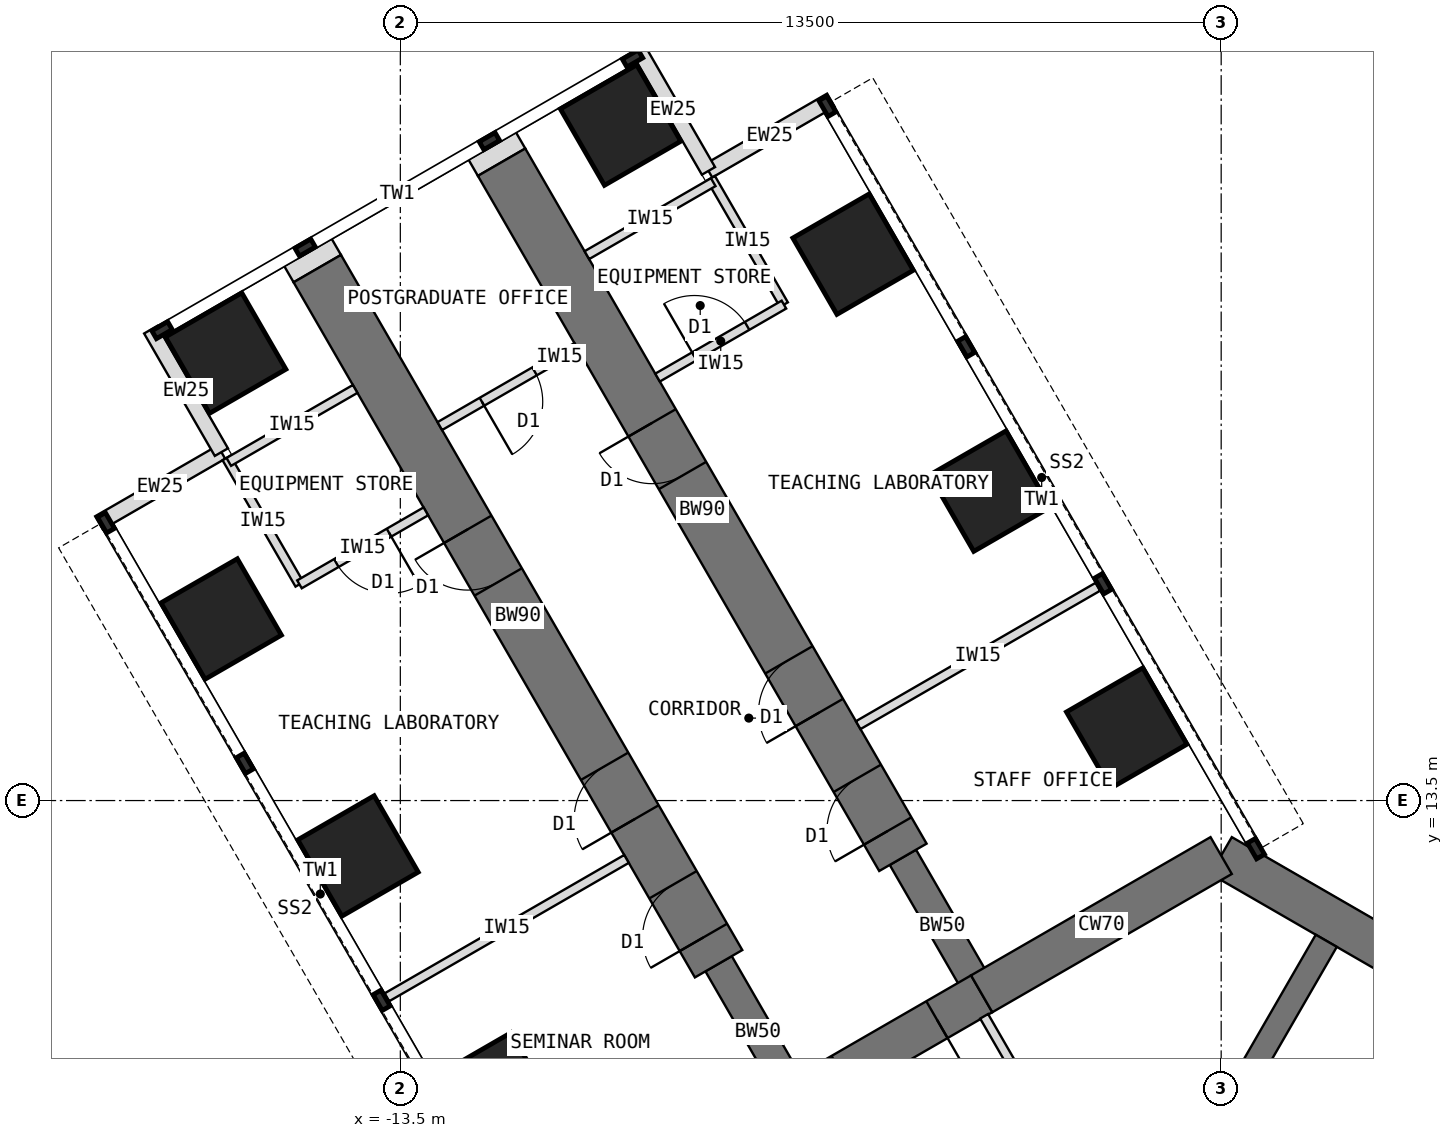
"""IFC4 building model, lengths in metres.
Left out: names, types, materials, properties, quantities, classifications, styles, units other than length and angle.
Written with IfcOpenShell. Run it as: python <this file> out.ifc"""

import sys

from ifc_helpers import new_model, si_unit, direction, frame, frame_2d, origin, origin_2d, place, context, subcontext, project, spatial, rectangle, extrude, element, fill, save


model = new_model("IFC4")
c1 = context("Model", 3, precision=1e-05, world=origin(), true_north=direction((0.0, 1.0)))
c2 = subcontext(c1, "Body", "Model", "MODEL_VIEW")
j1 = project(units=[si_unit("LENGTHUNIT", "METRE"), si_unit("PLANEANGLEUNIT", "RADIAN")], contexts=[c1])
p1 = place(None, origin())
s1 = spatial("IfcSite", under=j1, at=p1, CompositionType="ELEMENT")
p2 = place(p1, origin())
s2 = spatial("IfcBuilding", under=s1, at=p2, CompositionType="ELEMENT")
p3 = place(p2, frame((0.0, 0.0, 56.5)))
s3 = spatial("IfcBuildingStorey", under=s2, at=p3, CompositionType="ELEMENT", Elevation=56.5)
p4 = place(p3, frame((10.908, 6.298, 0.0), z_axis=(0.0, 0.0, 1.0), x_axis=(-0.866021940709, 0.500005998175, 0.0)))
e1 = element("IfcWall", 1, at=p4, inside=s3, PredefinedType="SHEAR", context=c2, shape_type="SweptSolid", body=[
    extrude(rectangle(XDim=12.596, YDim=0.7, at=frame_2d((6.298, 0.0))), origin(), (0.0, 0.0, 1.0), 4.0),
])
p5 = place(p3, frame((0.0, 12.596, 0.0), z_axis=(0.0, 0.0, 1.0), x_axis=(-0.866011268655, -0.500024481964, 0.0)))
e2 = element("IfcWall", 2, at=p5, inside=s3, PredefinedType="SHEAR", context=c2, shape_type="SweptSolid", body=[
    extrude(rectangle(XDim=4.548, YDim=0.7, at=frame_2d((2.274, 0.0))), origin(), (0.0, 0.0, 1.0), 4.0),
])
p6 = place(p3, frame((-3.939, 10.322, 0.0), z_axis=(0.0, 0.0, 1.0), x_axis=(-0.866019471182, -0.500010275428, 0.0)))
e3 = element("IfcWall", 3, at=p6, inside=s3, PredefinedType="SHEAR", context=c2, shape_type="SweptSolid", body=[
    extrude(rectangle(XDim=3.5, YDim=0.7, at=frame_2d((1.75, 0.0))), origin(), (0.0, 0.0, 1.0), 4.0),
])
p7 = place(p6, frame((0.85, 0.0, 0.0)))
e4 = element("IfcOpeningElement", 4, at=p7, cuts=e3, PredefinedType="OPENING", context=c2, shape_type="SweptSolid", body=[
    extrude(rectangle(XDim=1.8, YDim=2.1, at=frame_2d((0.9, 1.05))), frame((0.0, 0.36, 0.0), z_axis=(0.0, -1.0, 0.0), x_axis=(1.0, 0.0, 0.0)), (0.0, 0.0, 1.0), 0.72),
])
p8 = place(p3, frame((-6.97, 8.572, 0.0), z_axis=(0.0, 0.0, 1.0), x_axis=(-0.499988811324, 0.866031863473, 0.0)))
e5 = element("IfcWall", 5, at=p8, inside=s3, PredefinedType="SHEAR", context=c2, shape_type="SweptSolid", body=[
    extrude(rectangle(XDim=2.592, YDim=0.5, at=frame_2d((1.296, 0.0))), origin(), (0.0, 0.0, 1.0), 4.0),
])
p9 = place(p3, frame((-8.266, 10.816, 0.0), z_axis=(0.0, 0.0, 1.0), x_axis=(-0.499996231654, 0.866027579429, 0.0)))
e6 = element("IfcWall", 6, at=p9, inside=s3, PredefinedType="SHEAR", context=c2, shape_type="SweptSolid", body=[
    extrude(rectangle(XDim=13.2, YDim=0.9, at=frame_2d((6.6, 0.0))), origin(), (0.0, 0.0, 1.0), 4.0),
])
p10 = place(p9, frame((0.5, 0.0, 0.0)))
e7 = element("IfcOpeningElement", 7, at=p10, cuts=e6, PredefinedType="OPENING", context=c2, shape_type="SweptSolid", body=[
    extrude(rectangle(XDim=1.0, YDim=2.1, at=frame_2d((0.5, 1.05))), frame((0.0, 0.46, 0.0), z_axis=(0.0, -1.0, 0.0), x_axis=(1.0, 0.0, 0.0)), (0.0, 0.0, 1.0), 0.92),
])
p11 = place(p9, frame((2.75, 0.0, 0.0)))
e8 = element("IfcOpeningElement", 8, at=p11, cuts=e6, PredefinedType="OPENING", context=c2, shape_type="SweptSolid", body=[
    extrude(rectangle(XDim=1.0, YDim=2.1, at=frame_2d((0.5, 1.05))), frame((0.0, 0.46, 0.0), z_axis=(0.0, -1.0, 0.0), x_axis=(1.0, 0.0, 0.0)), (0.0, 0.0, 1.0), 0.92),
])
p12 = place(p9, frame((7.25, 0.0, 0.0)))
e9 = element("IfcOpeningElement", 9, at=p12, cuts=e6, PredefinedType="OPENING", context=c2, shape_type="SweptSolid", body=[
    extrude(rectangle(XDim=1.0, YDim=2.1, at=frame_2d((0.5, 1.05))), frame((0.0, 0.46, 0.0), z_axis=(0.0, -1.0, 0.0), x_axis=(1.0, 0.0, 0.0)), (0.0, 0.0, 1.0), 0.92),
])
p13 = place(p3, frame((-3.939, 10.322, 0.0), z_axis=(0.0, 0.0, 1.0), x_axis=(-0.499918158782, 0.866072649678, 0.0)))
e10 = element("IfcWall", 10, at=p13, inside=s3, PredefinedType="SHEAR", context=c2, shape_type="SweptSolid", body=[
    extrude(rectangle(XDim=2.592, YDim=0.5, at=frame_2d((1.296, 0.0))), origin(), (0.0, 0.0, 1.0), 4.0),
])
p14 = place(p3, frame((-5.234, 12.566, 0.0), z_axis=(0.0, 0.0, 1.0), x_axis=(-0.500010103361, 0.866019570528, 0.0)))
e11 = element("IfcWall", 11, at=p14, inside=s3, PredefinedType="SHEAR", context=c2, shape_type="SweptSolid", body=[
    extrude(rectangle(XDim=13.2, YDim=0.9, at=frame_2d((6.6, 0.0))), origin(), (0.0, 0.0, 1.0), 4.0),
])
p15 = place(p14, frame((0.5, 0.0, 0.0)))
e12 = element("IfcOpeningElement", 12, at=p15, cuts=e11, PredefinedType="OPENING", context=c2, shape_type="SweptSolid", body=[
    extrude(rectangle(XDim=1.0, YDim=2.1, at=frame_2d((0.5, 1.05))), frame((0.0, 0.46, 0.0), z_axis=(0.0, -1.0, 0.0), x_axis=(1.0, 0.0, 0.0)), (0.0, 0.0, 1.0), 0.92),
])
p16 = place(p14, frame((2.75, 0.0, 0.0)))
e13 = element("IfcOpeningElement", 13, at=p16, cuts=e11, PredefinedType="OPENING", context=c2, shape_type="SweptSolid", body=[
    extrude(rectangle(XDim=1.0, YDim=2.1, at=frame_2d((0.5, 1.05))), frame((0.0, 0.46, 0.0), z_axis=(0.0, -1.0, 0.0), x_axis=(1.0, 0.0, 0.0)), (0.0, 0.0, 1.0), 0.92),
])
p17 = place(p14, frame((7.25, 0.0, 0.0)))
e14 = element("IfcOpeningElement", 14, at=p17, cuts=e11, PredefinedType="OPENING", context=c2, shape_type="SweptSolid", body=[
    extrude(rectangle(XDim=1.0, YDim=2.1, at=frame_2d((0.5, 1.05))), frame((0.0, 0.46, 0.0), z_axis=(0.0, -1.0, 0.0), x_axis=(1.0, 0.0, 0.0)), (0.0, 0.0, 1.0), 0.92),
])
for number, where, z_axis, x_axis in (
    (15, (-11.946, 8.691, 0.0), (0.0, 0.0, 1.0), (0.866, 0.5, 0.0)),
    (16, (-1.554, 14.691, 0.0), (0.0, 0.0, 1.0), (0.866, 0.5, 0.0)),
    (17, (-14.196, 12.588, 0.0), (0.0, 0.0, 1.0), (0.866, 0.5, 0.0)),
    (18, (-3.804, 18.588, 0.0), (0.0, 0.0, 1.0), (0.866, 0.5, 0.0)),
    (19, (-16.446, 16.486, 0.0), (0.0, 0.0, 1.0), (0.866, 0.5, 0.0)),
    (20, (-6.054, 22.486, 0.0), (0.0, 0.0, 1.0), (0.866, 0.5, 0.0)),
    (21, (-16.373, 20.858, 0.0), (0.0, 0.0, 1.0), (0.866, 0.5, 0.0)),
    (22, (-9.877, 24.608, 0.0), (0.0, 0.0, 1.0), (0.866, 0.5, 0.0)),
):
    element("IfcColumn", number, at=place(p3, frame(where, z_axis=z_axis, x_axis=x_axis)), inside=s3, PredefinedType="COLUMN", context=c2, shape_type="SweptSolid", body=[
        extrude(rectangle(XDim=1.45, YDim=1.45, at=origin_2d()), origin(), (0.0, 0.0, 1.0), 4.0),
    ])
for number, where, z_axis, x_axis in (
    (23, (-18.456, 18.067, 0.0), (0.0, 0.0, 1.0), (0.866, 0.5, 0.0)),
    (24, (-16.443, 19.23, 0.0), (0.0, 0.0, 1.0), (-0.5, 0.866, 0.0)),
    (25, (-6.419, 25.017, 0.0), (0.0, 0.0, 1.0), (-0.866, -0.5, 0.0)),
    (26, (-8.432, 23.855, 0.0), (0.0, 0.0, 1.0), (-0.5, 0.866, 0.0)),
):
    element("IfcWall", number, at=place(p3, frame(where, z_axis=z_axis, x_axis=x_axis)), inside=s3, PredefinedType="STANDARD", context=c2, shape_type="SweptSolid", body=[
        extrude(rectangle(XDim=2.325, YDim=0.25, at=frame_2d((1.163, 0.0))), origin(), (0.0, 0.0, 1.0), 3.8),
    ])
for number, where, z_axis, x_axis in (
    (27, (-14.865, 22.248, 0.0), (0.0, 0.0, 1.0), (-0.5, 0.866, 0.0)),
    (28, (-11.834, 23.998, 0.0), (0.0, 0.0, 1.0), (-0.5, 0.866, 0.0)),
):
    element("IfcWall", number, at=place(p3, frame(where, z_axis=z_axis, x_axis=x_axis)), inside=s3, PredefinedType="PARTITIONING", context=c2, shape_type="SweptSolid", body=[
        extrude(rectangle(XDim=0.31, YDim=0.9, at=frame_2d((0.155, 0.0))), origin(), (0.0, 0.0, 1.0), 3.8),
    ])
p18 = place(p3, frame((-1.201, 6.12, 0.0), z_axis=(0.0, 0.0, 1.0), x_axis=(0.500002627198, 0.866023886965, 0.0)))
e29 = element("IfcWall", 29, at=p18, inside=s3, PredefinedType="SHEAR", context=c2, shape_type="SweptSolid", body=[
    extrude(rectangle(XDim=5.858, YDim=0.4, at=frame_2d((2.929, 0.0))), origin(), (0.0, 0.0, 1.0), 4.0),
])
p19 = place(p3, frame((-9.78, 12.54, 0.0), z_axis=(0.0, 0.0, 1.0), x_axis=(-0.866035472144, -0.499982560684, 0.0)))
e30 = element("IfcWall", 30, at=p19, inside=s3, PredefinedType="PARTITIONING", context=c2, shape_type="SweptSolid", body=[
    extrude(rectangle(XDim=4.55, YDim=0.15, at=frame_2d((2.275, 0.0))), origin(), (0.0, 0.0, 1.0), 3.8),
])
p20 = place(p3, frame((-15.159, 17.056, 0.0), z_axis=(0.0, 0.0, 1.0), x_axis=(-0.500001309137, 0.866024647952, 0.0)))
e31 = element("IfcWall", 31, at=p20, inside=s3, PredefinedType="PARTITIONING", context=c2, shape_type="SweptSolid", body=[
    extrude(rectangle(XDim=2.4, YDim=0.15, at=frame_2d((1.2, 0.0))), origin(), (0.0, 0.0, 1.0), 3.8),
])
p21 = place(p3, frame((-13.08, 18.256, 0.0), z_axis=(0.0, 0.0, 1.0), x_axis=(-0.866024647952, -0.500001309137, 0.0)))
e32 = element("IfcWall", 32, at=p21, inside=s3, PredefinedType="PARTITIONING", context=c2, shape_type="SweptSolid", body=[
    extrude(rectangle(XDim=2.4, YDim=0.15, at=frame_2d((1.2, 0.0))), origin(), (0.0, 0.0, 1.0), 3.8),
])
p22 = place(p21, frame((0.7, 0.0, 0.0)))
e33 = element("IfcOpeningElement", 33, at=p22, cuts=e32, PredefinedType="OPENING", context=c2, shape_type="SweptSolid", body=[
    extrude(rectangle(XDim=1.0, YDim=2.1, at=frame_2d((0.5, 1.05))), frame((0.0, 0.085, 0.0), z_axis=(0.0, -1.0, 0.0), x_axis=(1.0, 0.0, 0.0)), (0.0, 0.0, 1.0), 0.17),
])
p23 = place(p3, frame((-14.243, 20.269, 0.0), z_axis=(0.0, 0.0, 1.0), x_axis=(-0.866006032174, -0.500033551112, 0.0)))
e34 = element("IfcWall", 34, at=p23, inside=s3, PredefinedType="PARTITIONING", context=c2, shape_type="SweptSolid", body=[
    extrude(rectangle(XDim=2.4, YDim=0.15, at=frame_2d((1.2, 0.0))), origin(), (0.0, 0.0, 1.0), 3.8),
])
p24 = place(p3, frame((-5.97, 14.74, 0.0), z_axis=(0.0, 0.0, 1.0), x_axis=(0.866035472144, 0.499982560684, 0.0)))
e35 = element("IfcWall", 35, at=p24, inside=s3, PredefinedType="PARTITIONING", context=c2, shape_type="SweptSolid", body=[
    extrude(rectangle(XDim=4.55, YDim=0.15, at=frame_2d((2.275, 0.0))), origin(), (0.0, 0.0, 1.0), 3.8),
])
p25 = place(p3, frame((-7.191, 21.656, 0.0), z_axis=(0.0, 0.0, 1.0), x_axis=(-0.500077600433, 0.865980596518, 0.0)))
e36 = element("IfcWall", 36, at=p25, inside=s3, PredefinedType="PARTITIONING", context=c2, shape_type="SweptSolid", body=[
    extrude(rectangle(XDim=2.4, YDim=0.15, at=frame_2d((1.2, 0.0))), origin(), (0.0, 0.0, 1.0), 3.8),
])
p26 = place(p3, frame((-9.27, 20.456, 0.0), z_axis=(0.0, 0.0, 1.0), x_axis=(0.866006032174, 0.500033551112, 0.0)))
e37 = element("IfcWall", 37, at=p26, inside=s3, PredefinedType="PARTITIONING", context=c2, shape_type="SweptSolid", body=[
    extrude(rectangle(XDim=2.4, YDim=0.15, at=frame_2d((1.2, 0.0))), origin(), (0.0, 0.0, 1.0), 3.8),
])
p27 = place(p26, frame((0.7, 0.0, 0.0)))
e38 = element("IfcOpeningElement", 38, at=p27, cuts=e37, PredefinedType="OPENING", context=c2, shape_type="SweptSolid", body=[
    extrude(rectangle(XDim=1.0, YDim=2.1, at=frame_2d((0.5, 1.05))), frame((0.0, 0.085, 0.0), z_axis=(0.0, -1.0, 0.0), x_axis=(1.0, 0.0, 0.0)), (0.0, 0.0, 1.0), 0.17),
])
p28 = place(p3, frame((-10.432, 22.469, 0.0), z_axis=(0.0, 0.0, 1.0), x_axis=(0.866024647952, 0.500001309137, 0.0)))
e39 = element("IfcWall", 39, at=p28, inside=s3, PredefinedType="PARTITIONING", context=c2, shape_type="SweptSolid", body=[
    extrude(rectangle(XDim=2.4, YDim=0.15, at=frame_2d((1.2, 0.0))), origin(), (0.0, 0.0, 1.0), 3.8),
])
p29 = place(p3, frame((-3.898, 9.952, 0.0), z_axis=(0.0, 0.0, 1.0), x_axis=(0.499999927604, -0.866025445582, 0.0)))
e40 = element("IfcWall", 40, at=p29, inside=s3, PredefinedType="PARTITIONING", context=c2, shape_type="SweptSolid", body=[
    extrude(rectangle(XDim=4.468, YDim=0.15, at=frame_2d((2.234, 0.0))), origin(), (0.0, 0.0, 1.0), 3.8),
])
p30 = place(p29, frame((1.724, 0.0, 0.0)))
e41 = element("IfcOpeningElement", 41, at=p30, cuts=e40, PredefinedType="OPENING", context=c2, shape_type="SweptSolid", body=[
    extrude(rectangle(XDim=1.0, YDim=2.1, at=frame_2d((0.5, 1.05))), frame((0.0, 0.085, 0.0), z_axis=(0.0, -1.0, 0.0), x_axis=(1.0, 0.0, 0.0)), (0.0, 0.0, 1.0), 0.17),
])
p31 = place(p3, frame((-10.599, 20.958, 0.0), z_axis=(0.0, 0.0, 1.0), x_axis=(-0.866021400173, -0.500006934395, 0.0)))
e42 = element("IfcWall", 42, at=p31, inside=s3, PredefinedType="PARTITIONING", context=c2, shape_type="SweptSolid", body=[
    extrude(rectangle(XDim=2.6, YDim=0.15, at=frame_2d((1.3, 0.0))), origin(), (0.0, 0.0, 1.0), 3.8),
])
p32 = place(p31, frame((0.8, 0.0, 0.0)))
e43 = element("IfcOpeningElement", 43, at=p32, cuts=e42, PredefinedType="OPENING", context=c2, shape_type="SweptSolid", body=[
    extrude(rectangle(XDim=1.0, YDim=2.1, at=frame_2d((0.5, 1.05))), frame((0.0, 0.085, 0.0), z_axis=(0.0, -1.0, 0.0), x_axis=(1.0, 0.0, 0.0)), (0.0, 0.0, 1.0), 0.17),
])
p33 = place(p7, origin())
e44 = element("IfcDoor", 44, at=p33, inside=s3, OperationType="DOUBLE_DOOR_DOUBLE_SWING", PredefinedType="DOOR", context=c2, shape_type="SweptSolid", body=[
    extrude(rectangle(XDim=1.72, YDim=2.06, at=frame_2d((0.9, 1.03))), frame((0.0, 0.025, 0.0), z_axis=(0.0, -1.0, 0.0), x_axis=(1.0, 0.0, 0.0)), (0.0, 0.0, 1.0), 0.05),
    extrude(rectangle(XDim=0.04, YDim=2.1, at=frame_2d((0.02, 1.05))), frame((0.0, 0.35, 0.0), z_axis=(0.0, -1.0, 0.0), x_axis=(1.0, 0.0, 0.0)), (0.0, 0.0, 1.0), 0.699),
    extrude(rectangle(XDim=0.04, YDim=2.1, at=frame_2d((1.78, 1.05))), frame((0.0, 0.35, 0.0), z_axis=(0.0, -1.0, 0.0), x_axis=(1.0, 0.0, 0.0)), (0.0, 0.0, 1.0), 0.699),
    extrude(rectangle(XDim=1.72, YDim=0.04, at=frame_2d((0.9, 2.08))), frame((0.0, 0.35, 0.0), z_axis=(0.0, -1.0, 0.0), x_axis=(1.0, 0.0, 0.0)), (0.0, 0.0, 1.0), 0.699),
])
fill(e4, e44)
p34 = place(p22, origin())
e45 = element("IfcDoor", 45, at=p34, inside=s3, OperationType="SINGLE_SWING_LEFT", PredefinedType="DOOR", context=c2, shape_type="SweptSolid", body=[
    extrude(rectangle(XDim=1.0, YDim=2.1, at=frame_2d((0.5, 1.05))), frame((0.0, 0.025, 0.0), z_axis=(0.0, -1.0, 0.0), x_axis=(1.0, 0.0, 0.0)), (0.0, 0.0, 1.0), 0.05),
])
fill(e33, e45)
p35 = place(p27, origin())
e46 = element("IfcDoor", 46, at=p35, inside=s3, OperationType="SINGLE_SWING_LEFT", PredefinedType="DOOR", context=c2, shape_type="SweptSolid", body=[
    extrude(rectangle(XDim=1.0, YDim=2.1, at=frame_2d((0.5, 1.05))), frame((0.0, 0.025, 0.0), z_axis=(0.0, -1.0, 0.0), x_axis=(1.0, 0.0, 0.0)), (0.0, 0.0, 1.0), 0.05),
])
fill(e38, e46)
p36 = place(p32, origin())
e47 = element("IfcDoor", 47, at=p36, inside=s3, OperationType="SINGLE_SWING_RIGHT", PredefinedType="DOOR", context=c2, shape_type="SweptSolid", body=[
    extrude(rectangle(XDim=1.0, YDim=2.1, at=frame_2d((0.5, 1.05))), frame((0.0, 0.025, 0.0), z_axis=(0.0, -1.0, 0.0), x_axis=(1.0, 0.0, 0.0)), (0.0, 0.0, 1.0), 0.05),
])
fill(e43, e47)
p37 = place(p10, origin())
e48 = element("IfcDoor", 48, at=p37, inside=s3, OperationType="SINGLE_SWING_LEFT", PredefinedType="DOOR", context=c2, shape_type="SweptSolid", body=[
    extrude(rectangle(XDim=0.92, YDim=2.06, at=frame_2d((0.5, 1.03))), frame((0.0, 0.025, 0.0), z_axis=(0.0, -1.0, 0.0), x_axis=(1.0, 0.0, 0.0)), (0.0, 0.0, 1.0), 0.05),
    extrude(rectangle(XDim=0.04, YDim=2.1, at=frame_2d((0.02, 1.05))), frame((0.0, 0.45, 0.0), z_axis=(0.0, -1.0, 0.0), x_axis=(1.0, 0.0, 0.0)), (0.0, 0.0, 1.0), 0.899),
    extrude(rectangle(XDim=0.04, YDim=2.1, at=frame_2d((0.98, 1.05))), frame((0.0, 0.45, 0.0), z_axis=(0.0, -1.0, 0.0), x_axis=(1.0, 0.0, 0.0)), (0.0, 0.0, 1.0), 0.899),
    extrude(rectangle(XDim=0.92, YDim=0.04, at=frame_2d((0.5, 2.08))), frame((0.0, 0.45, 0.0), z_axis=(0.0, -1.0, 0.0), x_axis=(1.0, 0.0, 0.0)), (0.0, 0.0, 1.0), 0.899),
])
fill(e7, e48)
p38 = place(p11, origin())
e49 = element("IfcDoor", 49, at=p38, inside=s3, OperationType="SINGLE_SWING_LEFT", PredefinedType="DOOR", context=c2, shape_type="SweptSolid", body=[
    extrude(rectangle(XDim=0.92, YDim=2.06, at=frame_2d((0.5, 1.03))), frame((0.0, 0.025, 0.0), z_axis=(0.0, -1.0, 0.0), x_axis=(1.0, 0.0, 0.0)), (0.0, 0.0, 1.0), 0.05),
    extrude(rectangle(XDim=0.04, YDim=2.1, at=frame_2d((0.02, 1.05))), frame((0.0, 0.45, 0.0), z_axis=(0.0, -1.0, 0.0), x_axis=(1.0, 0.0, 0.0)), (0.0, 0.0, 1.0), 0.899),
    extrude(rectangle(XDim=0.04, YDim=2.1, at=frame_2d((0.98, 1.05))), frame((0.0, 0.45, 0.0), z_axis=(0.0, -1.0, 0.0), x_axis=(1.0, 0.0, 0.0)), (0.0, 0.0, 1.0), 0.899),
    extrude(rectangle(XDim=0.92, YDim=0.04, at=frame_2d((0.5, 2.08))), frame((0.0, 0.45, 0.0), z_axis=(0.0, -1.0, 0.0), x_axis=(1.0, 0.0, 0.0)), (0.0, 0.0, 1.0), 0.899),
])
fill(e8, e49)
p39 = place(p12, origin())
e50 = element("IfcDoor", 50, at=p39, inside=s3, OperationType="SINGLE_SWING_RIGHT", PredefinedType="DOOR", context=c2, shape_type="SweptSolid", body=[
    extrude(rectangle(XDim=0.92, YDim=2.06, at=frame_2d((0.5, 1.03))), frame((0.0, 0.025, 0.0), z_axis=(0.0, -1.0, 0.0), x_axis=(1.0, 0.0, 0.0)), (0.0, 0.0, 1.0), 0.05),
    extrude(rectangle(XDim=0.04, YDim=2.1, at=frame_2d((0.02, 1.05))), frame((0.0, 0.45, 0.0), z_axis=(0.0, -1.0, 0.0), x_axis=(1.0, 0.0, 0.0)), (0.0, 0.0, 1.0), 0.899),
    extrude(rectangle(XDim=0.04, YDim=2.1, at=frame_2d((0.98, 1.05))), frame((0.0, 0.45, 0.0), z_axis=(0.0, -1.0, 0.0), x_axis=(1.0, 0.0, 0.0)), (0.0, 0.0, 1.0), 0.899),
    extrude(rectangle(XDim=0.92, YDim=0.04, at=frame_2d((0.5, 2.08))), frame((0.0, 0.45, 0.0), z_axis=(0.0, -1.0, 0.0), x_axis=(1.0, 0.0, 0.0)), (0.0, 0.0, 1.0), 0.899),
])
fill(e9, e50)
p40 = place(p15, origin())
e51 = element("IfcDoor", 51, at=p40, inside=s3, OperationType="SINGLE_SWING_LEFT", PredefinedType="DOOR", context=c2, shape_type="SweptSolid", body=[
    extrude(rectangle(XDim=0.92, YDim=2.06, at=frame_2d((0.5, 1.03))), frame((0.0, 0.025, 0.0), z_axis=(0.0, -1.0, 0.0), x_axis=(1.0, 0.0, 0.0)), (0.0, 0.0, 1.0), 0.05),
    extrude(rectangle(XDim=0.04, YDim=2.1, at=frame_2d((0.02, 1.05))), frame((0.0, 0.45, 0.0), z_axis=(0.0, -1.0, 0.0), x_axis=(1.0, 0.0, 0.0)), (0.0, 0.0, 1.0), 0.899),
    extrude(rectangle(XDim=0.04, YDim=2.1, at=frame_2d((0.98, 1.05))), frame((0.0, 0.45, 0.0), z_axis=(0.0, -1.0, 0.0), x_axis=(1.0, 0.0, 0.0)), (0.0, 0.0, 1.0), 0.899),
    extrude(rectangle(XDim=0.92, YDim=0.04, at=frame_2d((0.5, 2.08))), frame((0.0, 0.45, 0.0), z_axis=(0.0, -1.0, 0.0), x_axis=(1.0, 0.0, 0.0)), (0.0, 0.0, 1.0), 0.899),
])
fill(e12, e51)
p41 = place(p16, origin())
e52 = element("IfcDoor", 52, at=p41, inside=s3, OperationType="SINGLE_SWING_LEFT", PredefinedType="DOOR", context=c2, shape_type="SweptSolid", body=[
    extrude(rectangle(XDim=0.92, YDim=2.06, at=frame_2d((0.5, 1.03))), frame((0.0, 0.025, 0.0), z_axis=(0.0, -1.0, 0.0), x_axis=(1.0, 0.0, 0.0)), (0.0, 0.0, 1.0), 0.05),
    extrude(rectangle(XDim=0.04, YDim=2.1, at=frame_2d((0.02, 1.05))), frame((0.0, 0.45, 0.0), z_axis=(0.0, -1.0, 0.0), x_axis=(1.0, 0.0, 0.0)), (0.0, 0.0, 1.0), 0.899),
    extrude(rectangle(XDim=0.04, YDim=2.1, at=frame_2d((0.98, 1.05))), frame((0.0, 0.45, 0.0), z_axis=(0.0, -1.0, 0.0), x_axis=(1.0, 0.0, 0.0)), (0.0, 0.0, 1.0), 0.899),
    extrude(rectangle(XDim=0.92, YDim=0.04, at=frame_2d((0.5, 2.08))), frame((0.0, 0.45, 0.0), z_axis=(0.0, -1.0, 0.0), x_axis=(1.0, 0.0, 0.0)), (0.0, 0.0, 1.0), 0.899),
])
fill(e13, e52)
p42 = place(p17, origin())
e53 = element("IfcDoor", 53, at=p42, inside=s3, OperationType="SINGLE_SWING_RIGHT", PredefinedType="DOOR", context=c2, shape_type="SweptSolid", body=[
    extrude(rectangle(XDim=0.92, YDim=2.06, at=frame_2d((0.5, 1.03))), frame((0.0, 0.025, 0.0), z_axis=(0.0, -1.0, 0.0), x_axis=(1.0, 0.0, 0.0)), (0.0, 0.0, 1.0), 0.05),
    extrude(rectangle(XDim=0.04, YDim=2.1, at=frame_2d((0.02, 1.05))), frame((0.0, 0.45, 0.0), z_axis=(0.0, -1.0, 0.0), x_axis=(1.0, 0.0, 0.0)), (0.0, 0.0, 1.0), 0.899),
    extrude(rectangle(XDim=0.04, YDim=2.1, at=frame_2d((0.98, 1.05))), frame((0.0, 0.45, 0.0), z_axis=(0.0, -1.0, 0.0), x_axis=(1.0, 0.0, 0.0)), (0.0, 0.0, 1.0), 0.899),
    extrude(rectangle(XDim=0.92, YDim=0.04, at=frame_2d((0.5, 2.08))), frame((0.0, 0.45, 0.0), z_axis=(0.0, -1.0, 0.0), x_axis=(1.0, 0.0, 0.0)), (0.0, 0.0, 1.0), 0.899),
])
fill(e14, e53)
save(model, sys.argv[1])
